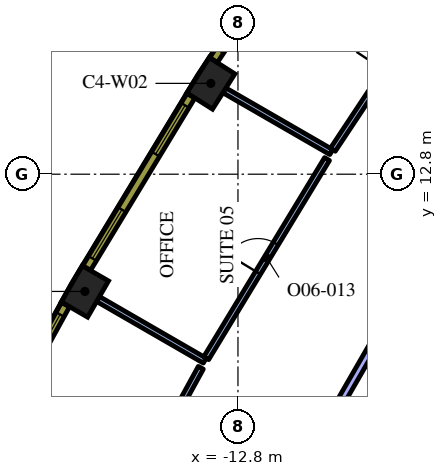
"""IFC4 building model, lengths in metres.
Left out: names, types, materials, properties, quantities, classifications, styles, units other than length and angle.
Written with IfcOpenShell. Run it as: python <this file> out.ifc"""

import sys

from ifc_helpers import new_model, si_unit, direction, frame, frame_2d, origin, origin_2d, place, context, subcontext, project, spatial, rectangle, extrude, element, fill, save


model = new_model("IFC4")
c1 = context("Model", 3, precision=1e-05, world=origin(), true_north=direction((0.0, 1.0)))
c2 = subcontext(c1, "Body", "Model", "MODEL_VIEW")
j1 = project(units=[si_unit("LENGTHUNIT", "METRE"), si_unit("PLANEANGLEUNIT", "RADIAN")], contexts=[c1])
p1 = place(None, origin())
s1 = spatial("IfcSite", under=j1, at=p1, CompositionType="ELEMENT")
p2 = place(p1, origin())
s2 = spatial("IfcBuilding", under=s1, at=p2, CompositionType="ELEMENT")
p3 = place(p2, frame((0.0, 0.0, 201.6)))
s3 = spatial("IfcBuildingStorey", under=s2, at=p3, CompositionType="ELEMENT", Elevation=201.6)
for number, where, z_axis, x_axis in (
    (1, (-13.513, 15.19, 0.0), (0.0, 0.0, 1.0), (-0.536, -0.845, 0.0)),
    (2, (-16.827, 9.715, 0.0), (0.0, 0.0, 1.0), (-0.5, -0.866, 0.0)),
):
    element("IfcColumn", number, at=place(p3, frame(where, z_axis=z_axis, x_axis=x_axis)), inside=s3, PredefinedType="COLUMN", context=c2, shape_type="SweptSolid", body=[
        extrude(rectangle(XDim=1.1, YDim=0.8, at=origin_2d()), origin(), (0.0, 0.0, 1.0), 4.2),
    ])
p4 = place(p3, frame((-12.625, -1.867, 0.0), z_axis=(0.0, 0.0, 1.0), x_axis=(0.499998841866, 0.866026072432, 0.0)))
e3 = element("IfcWall", 3, at=p4, inside=s3, PredefinedType="SOLIDWALL", context=c2, shape_type="SweptSolid", body=[
    extrude(rectangle(XDim=16.694, YDim=0.7, at=frame_2d((8.347, 0.0))), origin(), (0.0, 0.0, 1.0), 4.2),
])
p5 = place(p3, frame((-10.344, 13.382, 0.0), z_axis=(0.0, 0.0, 1.0), x_axis=(-0.865990253757, 0.500060876692, 0.0)))
e4 = element("IfcWall", 4, at=p5, inside=s3, PredefinedType="PARTITIONING", context=c2, shape_type="SweptSolid", body=[
    extrude(rectangle(XDim=3.247, YDim=0.15, at=frame_2d((1.624, 0.0))), origin(), (0.0, 0.0, 1.0), 3.45),
])
p6 = place(p3, frame((-10.303, 13.445, 0.0), z_axis=(0.0, 0.0, 1.0), x_axis=(0.552908115949, 0.833242230878, 0.0)))
e5 = element("IfcWall", 5, at=p6, inside=s3, PredefinedType="PARTITIONING", context=c2, shape_type="SweptSolid", body=[
    extrude(rectangle(XDim=5.789, YDim=0.15, at=frame_2d((2.895, 0.0))), origin(), (0.0, 0.0, 1.0), 3.45),
])
p7 = place(p6, frame((2.489, 0.0, 0.0)))
e6 = element("IfcOpeningElement", 6, at=p7, cuts=e5, PredefinedType="OPENING", context=c2, shape_type="SweptSolid", body=[
    extrude(rectangle(XDim=0.9, YDim=2.1, at=frame_2d((0.45, 1.05))), frame((0.0, 0.085, 0.0), z_axis=(0.0, -1.0, 0.0), x_axis=(1.0, 0.0, 0.0)), (0.0, 0.0, 1.0), 0.17),
])
p8 = place(p3, frame((-13.674, 7.895, 0.0), z_axis=(0.0, 0.0, 1.0), x_axis=(-0.866032537582, 0.499987643696, 0.0)))
e7 = element("IfcWall", 7, at=p8, inside=s3, PredefinedType="PARTITIONING", context=c2, shape_type="SweptSolid", body=[
    extrude(rectangle(XDim=3.241, YDim=0.15, at=frame_2d((1.62, 0.0))), origin(), (0.0, 0.0, 1.0), 3.45),
])
p9 = place(p3, frame((-13.635, 7.959, 0.0), z_axis=(0.0, 0.0, 1.0), x_axis=(0.518788941184, 0.854902353784, 0.0)))
e8 = element("IfcWall", 8, at=p9, inside=s3, PredefinedType="PARTITIONING", context=c2, shape_type="SweptSolid", body=[
    extrude(rectangle(XDim=6.129, YDim=0.15, at=frame_2d((3.064, 0.0))), origin(), (0.0, 0.0, 1.0), 3.45),
])
p10 = place(p9, frame((2.629, 0.0, 0.0)))
e9 = element("IfcOpeningElement", 9, at=p10, cuts=e8, PredefinedType="OPENING", context=c2, shape_type="SweptSolid", body=[
    extrude(rectangle(XDim=0.9, YDim=2.1, at=frame_2d((0.45, 1.05))), frame((0.0, 0.085, 0.0), z_axis=(0.0, -1.0, 0.0), x_axis=(1.0, 0.0, 0.0)), (0.0, 0.0, 1.0), 0.17),
])
p11 = place(p3, frame((-16.725, 2.333, 0.0), z_axis=(0.0, 0.0, 1.0), x_axis=(0.480955103875, 0.876745224142, 0.0)))
e10 = element("IfcWall", 10, at=p11, inside=s3, PredefinedType="PARTITIONING", context=c2, shape_type="SweptSolid", body=[
    extrude(rectangle(XDim=6.129, YDim=0.15, at=frame_2d((3.064, 0.0))), origin(), (0.0, 0.0, 1.0), 3.45),
])
p12 = place(p11, frame((2.629, 0.0, 0.0)))
e11 = element("IfcOpeningElement", 11, at=p12, cuts=e10, PredefinedType="OPENING", context=c2, shape_type="SweptSolid", body=[
    extrude(rectangle(XDim=0.9, YDim=2.1, at=frame_2d((0.45, 1.05))), frame((0.0, 0.085, 0.0), z_axis=(0.0, -1.0, 0.0), x_axis=(1.0, 0.0, 0.0)), (0.0, 0.0, 1.0), 0.17),
])
p13 = place(p3, frame((-8.272, 9.972, 0.0), z_axis=(0.0, 0.0, 1.0), x_axis=(-0.5000018851, -0.866024315419, 0.0)))
e12 = element("IfcWall", 12, at=p13, inside=s3, PredefinedType="PARTITIONING", context=c2, shape_type="SweptSolid", body=[
    extrude(rectangle(XDim=9.0, YDim=0.2, at=frame_2d((4.5, 0.0))), origin(), (0.0, 0.0, 1.0), 3.45),
])
p14 = place(p3, frame((-10.513, 20.218, 0.0), z_axis=(0.0, 0.0, 1.0), x_axis=(-0.552901821755, -0.833246407433, 0.0)))
e13 = element("IfcWall", 13, at=p14, inside=s3, PredefinedType="SOLIDWALL", context=c2, shape_type="SweptSolid", body=[
    extrude(rectangle(XDim=5.298, YDim=0.24, at=frame_2d((2.649, 0.0))), origin(), (0.0, 0.0, 1.0), 3.95),
])
p15 = place(p14, frame((0.294, 0.0, 0.9)))
e14 = element("IfcOpeningElement", 14, at=p15, cuts=e13, PredefinedType="OPENING", context=c2, shape_type="SweptSolid", body=[
    extrude(rectangle(XDim=1.5, YDim=2.55, at=frame_2d((0.75, 1.275))), frame((0.0, 0.13, 0.0), z_axis=(0.0, -1.0, 0.0), x_axis=(1.0, 0.0, 0.0)), (0.0, 0.0, 1.0), 0.26),
])
p16 = place(p14, frame((3.504, 0.0, 0.9)))
e15 = element("IfcOpeningElement", 15, at=p16, cuts=e13, PredefinedType="OPENING", context=c2, shape_type="SweptSolid", body=[
    extrude(rectangle(XDim=1.5, YDim=2.55, at=frame_2d((0.75, 1.275))), frame((0.0, 0.13, 0.0), z_axis=(0.0, -1.0, 0.0), x_axis=(1.0, 0.0, 0.0)), (0.0, 0.0, 1.0), 0.26),
])
p17 = place(p3, frame((-14.038, 14.864, 0.0), z_axis=(0.0, 0.0, 1.0), x_axis=(-0.517846166225, -0.855473756538, 0.0)))
e16 = element("IfcWall", 16, at=p17, inside=s3, PredefinedType="SOLIDWALL", context=c2, shape_type="SweptSolid", body=[
    extrude(rectangle(XDim=5.298, YDim=0.24, at=frame_2d((2.649, 0.0))), origin(), (0.0, 0.0, 1.0), 3.95),
])
p18 = place(p17, frame((0.294, 0.0, 0.9)))
e17 = element("IfcOpeningElement", 17, at=p18, cuts=e16, PredefinedType="OPENING", context=c2, shape_type="SweptSolid", body=[
    extrude(rectangle(XDim=1.5, YDim=2.55, at=frame_2d((0.75, 1.275))), frame((0.0, 0.13, 0.0), z_axis=(0.0, -1.0, 0.0), x_axis=(1.0, 0.0, 0.0)), (0.0, 0.0, 1.0), 0.26),
])
p19 = place(p17, frame((3.504, 0.0, 0.9)))
e18 = element("IfcOpeningElement", 18, at=p19, cuts=e16, PredefinedType="OPENING", context=c2, shape_type="SweptSolid", body=[
    extrude(rectangle(XDim=1.5, YDim=2.55, at=frame_2d((0.75, 1.275))), frame((0.0, 0.13, 0.0), z_axis=(0.0, -1.0, 0.0), x_axis=(1.0, 0.0, 0.0)), (0.0, 0.0, 1.0), 0.26),
])
p20 = place(p3, frame((-17.338, 9.368, 0.0), z_axis=(0.0, 0.0, 1.0), x_axis=(-0.481925825015, -0.876212017256, 0.0)))
e19 = element("IfcWall", 19, at=p20, inside=s3, PredefinedType="SOLIDWALL", context=c2, shape_type="SweptSolid", body=[
    extrude(rectangle(XDim=5.299, YDim=0.24, at=frame_2d((2.649, 0.0))), origin(), (0.0, 0.0, 1.0), 3.95),
])
p21 = place(p20, frame((0.295, 0.0, 0.9)))
e20 = element("IfcOpeningElement", 20, at=p21, cuts=e19, PredefinedType="OPENING", context=c2, shape_type="SweptSolid", body=[
    extrude(rectangle(XDim=1.5, YDim=2.55, at=frame_2d((0.75, 1.275))), frame((0.0, 0.13, 0.0), z_axis=(0.0, -1.0, 0.0), x_axis=(1.0, 0.0, 0.0)), (0.0, 0.0, 1.0), 0.26),
])
p22 = place(p20, frame((3.504, 0.0, 0.9)))
e21 = element("IfcOpeningElement", 21, at=p22, cuts=e19, PredefinedType="OPENING", context=c2, shape_type="SweptSolid", body=[
    extrude(rectangle(XDim=1.5, YDim=2.55, at=frame_2d((0.75, 1.275))), frame((0.0, 0.13, 0.0), z_axis=(0.0, -1.0, 0.0), x_axis=(1.0, 0.0, 0.0)), (0.0, 0.0, 1.0), 0.26),
])
p23 = place(p10, origin())
e22 = element("IfcDoor", 22, at=p23, inside=s3, OperationType="SINGLE_SWING_RIGHT", PredefinedType="DOOR", context=c2, shape_type="SweptSolid", body=[
    extrude(rectangle(XDim=0.9, YDim=2.1, at=frame_2d((0.45, 1.05))), frame((0.0, 0.025, 0.0), z_axis=(0.0, -1.0, 0.0), x_axis=(1.0, 0.0, 0.0)), (0.0, 0.0, 1.0), 0.05),
])
fill(e9, e22)
p24 = place(p18, origin())
e23 = element("IfcWindow", 23, at=p24, inside=s3, PartitioningType="SINGLE_PANEL", PredefinedType="WINDOW", context=c2, shape_type="SweptSolid", body=[
    extrude(rectangle(XDim=1.5, YDim=2.55, at=frame_2d((0.75, 1.275))), frame((0.0, 0.04, 0.0), z_axis=(0.0, -1.0, 0.0), x_axis=(1.0, 0.0, 0.0)), (0.0, 0.0, 1.0), 0.06),
])
fill(e17, e23)
p25 = place(p19, origin())
e24 = element("IfcWindow", 24, at=p25, inside=s3, PartitioningType="SINGLE_PANEL", PredefinedType="WINDOW", context=c2, shape_type="SweptSolid", body=[
    extrude(rectangle(XDim=1.5, YDim=2.55, at=frame_2d((0.75, 1.275))), frame((0.0, 0.04, 0.0), z_axis=(0.0, -1.0, 0.0), x_axis=(1.0, 0.0, 0.0)), (0.0, 0.0, 1.0), 0.06),
])
fill(e18, e24)
p26 = place(p21, origin())
e25 = element("IfcWindow", 25, at=p26, inside=s3, PartitioningType="SINGLE_PANEL", PredefinedType="WINDOW", context=c2, shape_type="SweptSolid", body=[
    extrude(rectangle(XDim=1.5, YDim=2.55, at=frame_2d((0.75, 1.275))), frame((0.0, 0.04, 0.0), z_axis=(0.0, -1.0, 0.0), x_axis=(1.0, 0.0, 0.0)), (0.0, 0.0, 1.0), 0.06),
])
fill(e20, e25)
save(model, sys.argv[1])
